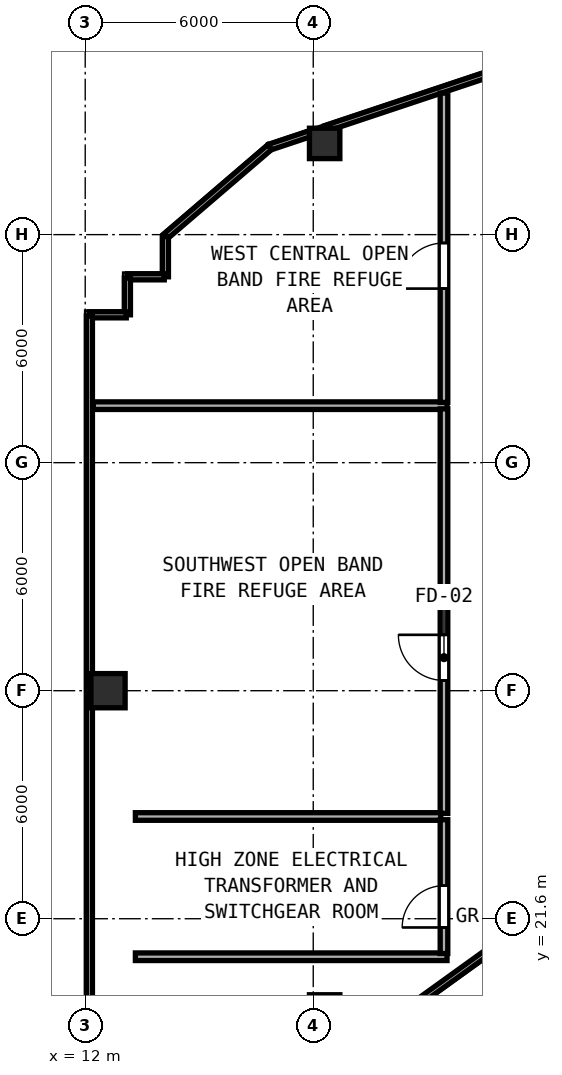
"""IFC4 building model, lengths in metres.
Left out: names, types, materials, properties, quantities, classifications, styles, units other than length and angle.
Written with IfcOpenShell. Run it as: python <this file> out.ifc"""

import sys

from ifc_helpers import new_model, si_unit, direction, frame, frame_2d, origin, origin_2d, place, context, subcontext, project, spatial, rectangle, hollow_rectangle, extrude, element, fill, save


model = new_model("IFC4")
c1 = context("Model", 3, precision=1e-05, world=origin(), true_north=direction((0.0, 1.0)))
c2 = subcontext(c1, "Body", "Model", "MODEL_VIEW")
j1 = project(units=[si_unit("LENGTHUNIT", "METRE"), si_unit("PLANEANGLEUNIT", "RADIAN")], contexts=[c1])
p1 = place(None, origin())
s1 = spatial("IfcSite", under=j1, at=p1, CompositionType="ELEMENT")
p2 = place(p1, origin())
s2 = spatial("IfcBuilding", under=s1, at=p2, CompositionType="ELEMENT")
p3 = place(p2, frame((0.0, 0.0, 207.0)))
s3 = spatial("IfcBuildingStorey", under=s2, at=p3, CompositionType="ELEMENT", Elevation=207.0)
p4 = place(p3, frame((12.6, 27.6, 0.0), z_axis=(0.0, 0.0, 1.0), x_axis=(1.0, 0.0, 0.0)))
e1 = element("IfcColumn", 1, at=p4, inside=s3, PredefinedType="COLUMN", context=c2, shape_type="SweptSolid", body=[
    extrude(hollow_rectangle(XDim=0.9, YDim=0.9, WallThickness=0.034, at=origin_2d()), origin(), (0.0, 0.0, 1.0), 4.6),
])
p5 = place(p3, frame((18.3, 42.0, 0.0), z_axis=(0.0, 0.0, 1.0), x_axis=(1.0, 0.0, 0.0)))
e2 = element("IfcColumn", 2, at=p5, inside=s3, PredefinedType="COLUMN", context=c2, shape_type="SweptSolid", body=[
    extrude(hollow_rectangle(XDim=0.8, YDim=0.8, WallThickness=0.03, at=origin_2d()), origin(), (0.0, 0.0, 1.0), 4.6),
])
p6 = place(p3, frame((24.082, 44.311, 0.0), z_axis=(0.0, 0.0, 1.0), x_axis=(-0.948687320562, -0.316215698225, 0.0)))
e3 = element("IfcWall", 3, at=p6, inside=s3, PredefinedType="PARAPET", context=c2, shape_type="SweptSolid", body=[
    extrude(rectangle(XDim=6.069, YDim=0.16, at=frame_2d((3.035, 0.0))), origin(), (0.0, 0.0, 1.0), 1.15),
])
p7 = place(p3, frame((17.908, 42.253, 0.0), z_axis=(0.0, 0.0, 1.0), x_axis=(-0.948705297269, -0.316161760709, 0.0)))
e4 = element("IfcWall", 4, at=p7, inside=s3, PredefinedType="PARAPET", context=c2, shape_type="SweptSolid", body=[
    extrude(rectangle(XDim=1.11, YDim=0.16, at=frame_2d((0.555, 0.0))), origin(), (0.0, 0.0, 1.0), 1.15),
])
p8 = place(p3, frame((16.855, 41.903, 0.0), z_axis=(0.0, 0.0, 1.0), x_axis=(-0.759213704594, -0.650841417518, 0.0)))
e5 = element("IfcWall", 5, at=p8, inside=s3, PredefinedType="PARAPET", context=c2, shape_type="SweptSolid", body=[
    extrude(rectangle(XDim=3.616, YDim=0.16, at=frame_2d((1.808, 0.0))), origin(), (0.0, 0.0, 1.0), 1.15),
])
p9 = place(p3, frame((14.11, 39.549, 0.0), z_axis=(0.0, 0.0, 1.0), x_axis=(0.0, -1.0, 0.0)))
e6 = element("IfcWall", 6, at=p9, inside=s3, PredefinedType="PARAPET", context=c2, shape_type="SweptSolid", body=[
    extrude(rectangle(XDim=1.059, YDim=0.16, at=frame_2d((0.53, 0.0))), origin(), (0.0, 0.0, 1.0), 1.15),
])
for number, where, z_axis, x_axis in (
    (7, (14.08, 38.49, 0.0), (0.0, 0.0, 1.0), (-1.0, 0.0, 0.0)),
    (8, (13.11, 38.46, 0.0), (0.0, 0.0, 1.0), (0.0, -1.0, 0.0)),
    (9, (13.08, 37.49, 0.0), (0.0, 0.0, 1.0), (-1.0, 0.0, 0.0)),
):
    element("IfcWall", number, at=place(p3, frame(where, z_axis=z_axis, x_axis=x_axis)), inside=s3, PredefinedType="PARAPET", context=c2, shape_type="SweptSolid", body=[
        extrude(rectangle(XDim=0.97, YDim=0.16, at=frame_2d((0.485, 0.0))), origin(), (0.0, 0.0, 1.0), 1.15),
    ])
p10 = place(p3, frame((12.11, 37.46, 0.0), z_axis=(0.0, 0.0, 1.0), x_axis=(0.0, -1.0, 0.0)))
e10 = element("IfcWall", 10, at=p10, inside=s3, PredefinedType="PARAPET", context=c2, shape_type="SweptSolid", body=[
    extrude(rectangle(XDim=20.95, YDim=0.16, at=frame_2d((10.475, 0.0))), origin(), (0.0, 0.0, 1.0), 1.15),
])
p11 = place(p3, frame((14.183, 14.667, 0.0), z_axis=(0.0, 0.0, 1.0), x_axis=(0.811534341451, 0.584304725845, 0.0)))
e11 = element("IfcWall", 11, at=p11, inside=s3, PredefinedType="PARAPET", context=c2, shape_type="SweptSolid", body=[
    extrude(rectangle(XDim=11.552, YDim=0.16, at=frame_2d((5.776, 0.0))), origin(), (0.0, 0.0, 1.0), 1.15),
])
p12 = place(p3, frame((12.212, 35.1, 0.0), z_axis=(0.0, 0.0, 1.0), x_axis=(1.0, 0.0, 0.0)))
e12 = element("IfcWall", 12, at=p12, inside=s3, PredefinedType="SOLIDWALL", context=c2, shape_type="SweptSolid", body=[
    extrude(rectangle(XDim=9.308, YDim=0.2, at=frame_2d((4.654, 0.0))), origin(), (0.0, 0.0, 1.0), 4.42),
])
p13 = place(p3, frame((21.44, 24.37, 0.0), z_axis=(0.0, 0.0, 1.0), x_axis=(0.0, 1.0, 0.0)))
e13 = element("IfcWall", 13, at=p13, inside=s3, PredefinedType="SOLIDWALL", context=c2, shape_type="SweptSolid", body=[
    extrude(rectangle(XDim=10.645, YDim=0.2, at=frame_2d((5.322, 0.0))), origin(), (0.0, 0.0, 1.0), 4.42),
])
p14 = place(p13, frame((4.7, 0.0, 0.0), z_axis=(0.0, 0.0, 1.0), x_axis=(-1.0, 0.0, 0.0)))
e14 = element("IfcOpeningElement", 14, at=p14, cuts=e13, PredefinedType="OPENING", context=c2, shape_type="SweptSolid", body=[
    extrude(rectangle(XDim=1.2, YDim=2.15, at=frame_2d((0.6, 1.075))), frame((0.0, 0.11, 0.0), z_axis=(0.0, -1.0, 0.0), x_axis=(1.0, 0.0, 0.0)), (0.0, 0.0, 1.0), 0.22),
])
p15 = place(p3, frame((21.44, 35.185, 0.0), z_axis=(0.0, 0.0, 1.0), x_axis=(0.0, 1.0, 0.0)))
e15 = element("IfcWall", 15, at=p15, inside=s3, PredefinedType="SOLIDWALL", context=c2, shape_type="SweptSolid", body=[
    extrude(rectangle(XDim=8.138, YDim=0.2, at=frame_2d((4.069, 0.0))), origin(), (0.0, 0.0, 1.0), 4.42),
])
p16 = place(p15, frame((4.195, 0.0, 0.0), z_axis=(0.0, 0.0, 1.0), x_axis=(-1.0, 0.0, 0.0)))
e16 = element("IfcOpeningElement", 16, at=p16, cuts=e15, PredefinedType="OPENING", context=c2, shape_type="SweptSolid", body=[
    extrude(rectangle(XDim=1.2, YDim=2.15, at=frame_2d((0.6, 1.075))), frame((0.0, 0.11, 0.0), z_axis=(0.0, -1.0, 0.0), x_axis=(1.0, 0.0, 0.0)), (0.0, 0.0, 1.0), 0.22),
])
p17 = place(p3, frame((13.32, 24.29, 0.0), z_axis=(0.0, 0.0, 1.0), x_axis=(1.0, 0.0, 0.0)))
e17 = element("IfcWall", 17, at=p17, inside=s3, PredefinedType="SOLIDWALL", context=c2, shape_type="SweptSolid", body=[
    extrude(rectangle(XDim=8.035, YDim=0.2, at=frame_2d((4.018, 0.0))), origin(), (0.0, 0.0, 1.0), 4.42),
])
p18 = place(p3, frame((13.32, 20.6, 0.0), z_axis=(0.0, 0.0, 1.0), x_axis=(1.0, 0.0, 0.0)))
e18 = element("IfcWall", 18, at=p18, inside=s3, PredefinedType="SOLIDWALL", context=c2, shape_type="SweptSolid", body=[
    extrude(rectangle(XDim=8.2, YDim=0.2, at=frame_2d((4.1, 0.0))), origin(), (0.0, 0.0, 1.0), 4.42),
])
p19 = place(p3, frame((21.44, 20.685, 0.0), z_axis=(0.0, 0.0, 1.0), x_axis=(0.0, 1.0, 0.0)))
e19 = element("IfcWall", 19, at=p19, inside=s3, PredefinedType="SOLIDWALL", context=c2, shape_type="SweptSolid", body=[
    extrude(rectangle(XDim=3.52, YDim=0.2, at=frame_2d((1.76, 0.0))), origin(), (0.0, 0.0, 1.0), 4.42),
])
p20 = place(p19, frame((1.785, 0.0, 0.0), z_axis=(0.0, 0.0, 1.0), x_axis=(-1.0, 0.0, 0.0)))
e20 = element("IfcOpeningElement", 20, at=p20, cuts=e19, PredefinedType="OPENING", context=c2, shape_type="SweptSolid", body=[
    extrude(rectangle(XDim=1.1, YDim=2.15, at=frame_2d((0.55, 1.075))), frame((0.0, 0.11, 0.0), z_axis=(0.0, -1.0, 0.0), x_axis=(1.0, 0.0, 0.0)), (0.0, 0.0, 1.0), 0.22),
])
p21 = place(p14, origin())
e21 = element("IfcDoor", 21, at=p21, inside=s3, OperationType="SINGLE_SWING_LEFT", PredefinedType="DOOR", context=c2, shape_type="SweptSolid", body=[
    extrude(rectangle(XDim=1.2, YDim=2.15, at=frame_2d((0.6, 1.075))), frame((0.0, 0.025, 0.0), z_axis=(0.0, -1.0, 0.0), x_axis=(1.0, 0.0, 0.0)), (0.0, 0.0, 1.0), 0.05),
])
fill(e14, e21)
p22 = place(p16, origin())
e22 = element("IfcDoor", 22, at=p22, inside=s3, OperationType="SINGLE_SWING_RIGHT", PredefinedType="DOOR", context=c2, shape_type="SweptSolid", body=[
    extrude(rectangle(XDim=1.2, YDim=2.15, at=frame_2d((0.6, 1.075))), frame((0.0, 0.025, 0.0), z_axis=(0.0, -1.0, 0.0), x_axis=(1.0, 0.0, 0.0)), (0.0, 0.0, 1.0), 0.05),
])
fill(e16, e22)
p23 = place(p20, origin())
e23 = element("IfcDoor", 23, at=p23, inside=s3, OperationType="SINGLE_SWING_RIGHT", PredefinedType="DOOR", context=c2, shape_type="SweptSolid", body=[
    extrude(rectangle(XDim=1.1, YDim=2.15, at=frame_2d((0.55, 1.075))), frame((0.0, 0.025, 0.0), z_axis=(0.0, -1.0, 0.0), x_axis=(1.0, 0.0, 0.0)), (0.0, 0.0, 1.0), 0.05),
])
fill(e20, e23)
save(model, sys.argv[1])
